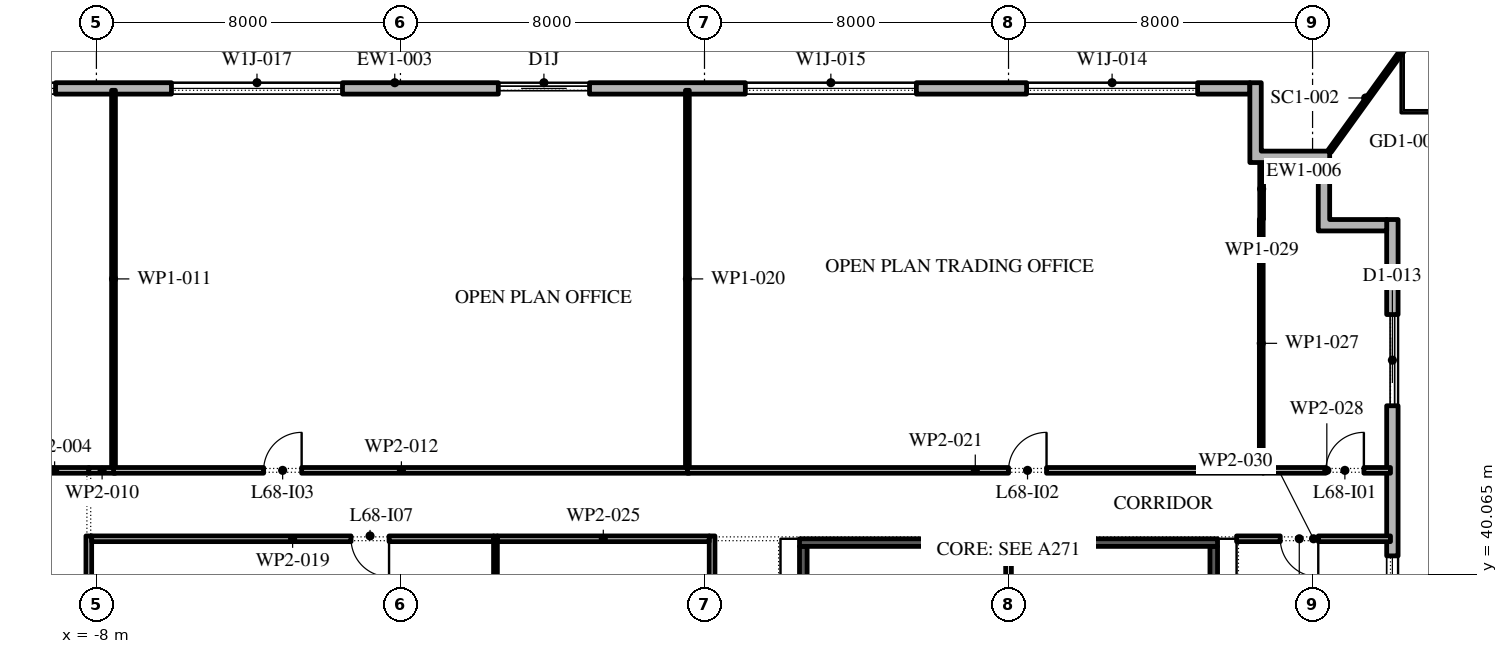
"""IFC4 building model, lengths in metres.
Left out: names, types, materials, properties, quantities, classifications, styles, units other than length and angle.
Written with IfcOpenShell. Run it as: python <this file> out.ifc"""

import sys

from ifc_helpers import new_model, si_unit, direction, frame, frame_2d, origin, place, context, subcontext, project, spatial, polyline, rectangle, outline, extrude, element, fill, save


model = new_model("IFC4")
c1 = context("Model", 3, precision=1e-05, world=origin(), true_north=direction((0.0, 1.0)))
c2 = subcontext(c1, "Body", "Model", "MODEL_VIEW")
j1 = project(units=[si_unit("LENGTHUNIT", "METRE"), si_unit("PLANEANGLEUNIT", "RADIAN")], contexts=[c1])
p1 = place(None, origin())
s1 = spatial("IfcSite", under=j1, at=p1, CompositionType="ELEMENT")
p2 = place(p1, origin())
s2 = spatial("IfcBuilding", under=s1, at=p2, CompositionType="ELEMENT")
p3 = place(p2, frame((0.0, 0.0, 313.2)))
s3 = spatial("IfcBuildingStorey", under=s2, at=p3, CompositionType="ELEMENT", Elevation=313.2)
p4 = place(p3, frame((26.1, -2.1, 0.0), z_axis=(0.0, 0.0, 1.0), x_axis=(0.0, 1.0, 0.0)))
e1 = element("IfcWall", 1, at=p4, inside=s3, PredefinedType="STANDARD", context=c2, shape_type="SweptSolid", body=[
    extrude(rectangle(XDim=51.5, YDim=0.3, at=frame_2d((25.75, 0.0))), origin(), (0.0, 0.0, 1.0), 4.0),
])
p5 = place(p4, frame((1.3, 0.0, 0.45)))
e2 = element("IfcOpeningElement", 2, at=p5, cuts=e1, PredefinedType="OPENING", context=c2, shape_type="SweptSolid", body=[
    extrude(rectangle(XDim=4.5, YDim=3.05, at=frame_2d((2.25, 1.525))), frame((0.0, 0.16, 0.0), z_axis=(0.0, -1.0, 0.0), x_axis=(1.0, 0.0, 0.0)), (0.0, 0.0, 1.0), 0.32),
])
p6 = place(p4, frame((8.55, 0.0, 0.45)))
e3 = element("IfcOpeningElement", 3, at=p6, cuts=e1, PredefinedType="OPENING", context=c2, shape_type="SweptSolid", body=[
    extrude(rectangle(XDim=4.5, YDim=3.05, at=frame_2d((2.25, 1.525))), frame((0.0, 0.16, 0.0), z_axis=(0.0, -1.0, 0.0), x_axis=(1.0, 0.0, 0.0)), (0.0, 0.0, 1.0), 0.32),
])
p7 = place(p4, frame((17.0, 0.0, 0.0)))
e4 = element("IfcOpeningElement", 4, at=p7, cuts=e1, PredefinedType="OPENING", context=c2, shape_type="SweptSolid", body=[
    extrude(rectangle(XDim=2.4, YDim=3.5, at=frame_2d((1.2, 1.75))), frame((0.0, 0.16, 0.0), z_axis=(0.0, -1.0, 0.0), x_axis=(1.0, 0.0, 0.0)), (0.0, 0.0, 1.0), 0.32),
])
p8 = place(p4, frame((23.35, 0.0, 0.45)))
e5 = element("IfcOpeningElement", 5, at=p8, cuts=e1, PredefinedType="OPENING", context=c2, shape_type="SweptSolid", body=[
    extrude(rectangle(XDim=4.5, YDim=3.05, at=frame_2d((2.25, 1.525))), frame((0.0, 0.16, 0.0), z_axis=(0.0, -1.0, 0.0), x_axis=(1.0, 0.0, 0.0)), (0.0, 0.0, 1.0), 0.32),
])
p9 = place(p4, frame((30.75, 0.0, 0.45)))
e6 = element("IfcOpeningElement", 6, at=p9, cuts=e1, PredefinedType="OPENING", context=c2, shape_type="SweptSolid", body=[
    extrude(rectangle(XDim=4.5, YDim=3.05, at=frame_2d((2.25, 1.525))), frame((0.0, 0.16, 0.0), z_axis=(0.0, -1.0, 0.0), x_axis=(1.0, 0.0, 0.0)), (0.0, 0.0, 1.0), 0.32),
])
p10 = place(p4, frame((38.15, 0.0, 0.45)))
e7 = element("IfcOpeningElement", 7, at=p10, cuts=e1, PredefinedType="OPENING", context=c2, shape_type="SweptSolid", body=[
    extrude(rectangle(XDim=4.5, YDim=3.05, at=frame_2d((2.25, 1.525))), frame((0.0, 0.16, 0.0), z_axis=(0.0, -1.0, 0.0), x_axis=(1.0, 0.0, 0.0)), (0.0, 0.0, 1.0), 0.32),
])
p11 = place(p4, frame((46.6, 0.0, 0.0)))
e8 = element("IfcOpeningElement", 8, at=p11, cuts=e1, PredefinedType="OPENING", context=c2, shape_type="SweptSolid", body=[
    extrude(rectangle(XDim=2.4, YDim=3.5, at=frame_2d((1.2, 1.75))), frame((0.0, 0.16, 0.0), z_axis=(0.0, -1.0, 0.0), x_axis=(1.0, 0.0, 0.0)), (0.0, 0.0, 1.0), 0.32),
])
p12 = place(p3, frame((22.35, 52.85, 0.0), z_axis=(0.0, 0.0, 1.0), x_axis=(-1.0, 0.0, 0.0)))
e9 = element("IfcWall", 9, at=p12, inside=s3, PredefinedType="STANDARD", context=c2, shape_type="SweptSolid", body=[
    extrude(rectangle(XDim=45.0, YDim=0.3, at=frame_2d((22.5, 0.0))), origin(), (0.0, 0.0, 1.0), 4.0),
])
p13 = place(p12, frame((1.375, 0.0, 0.45)))
e10 = element("IfcOpeningElement", 10, at=p13, cuts=e9, PredefinedType="OPENING", context=c2, shape_type="SweptSolid", body=[
    extrude(rectangle(XDim=4.5, YDim=2.675, at=frame_2d((2.25, 1.337))), frame((0.0, 0.16, 0.0), z_axis=(0.0, -1.0, 0.0), x_axis=(1.0, 0.0, 0.0)), (0.0, 0.0, 1.0), 0.32),
])
p14 = place(p12, frame((8.775, 0.0, 0.45)))
e11 = element("IfcOpeningElement", 11, at=p14, cuts=e9, PredefinedType="OPENING", context=c2, shape_type="SweptSolid", body=[
    extrude(rectangle(XDim=4.5, YDim=2.675, at=frame_2d((2.25, 1.337))), frame((0.0, 0.16, 0.0), z_axis=(0.0, -1.0, 0.0), x_axis=(1.0, 0.0, 0.0)), (0.0, 0.0, 1.0), 0.32),
])
p15 = place(p12, frame((17.375, 0.0, 0.0)))
e12 = element("IfcOpeningElement", 12, at=p15, cuts=e9, PredefinedType="OPENING", context=c2, shape_type="SweptSolid", body=[
    extrude(rectangle(XDim=2.4, YDim=3.125, at=frame_2d((1.2, 1.562))), frame((0.0, 0.16, 0.0), z_axis=(0.0, -1.0, 0.0), x_axis=(1.0, 0.0, 0.0)), (0.0, 0.0, 1.0), 0.32),
])
p16 = place(p12, frame((23.875, 0.0, 0.45)))
e13 = element("IfcOpeningElement", 13, at=p16, cuts=e9, PredefinedType="OPENING", context=c2, shape_type="SweptSolid", body=[
    extrude(rectangle(XDim=4.5, YDim=2.675, at=frame_2d((2.25, 1.337))), frame((0.0, 0.16, 0.0), z_axis=(0.0, -1.0, 0.0), x_axis=(1.0, 0.0, 0.0)), (0.0, 0.0, 1.0), 0.32),
])
p17 = place(p12, frame((31.425, 0.0, 0.45)))
e14 = element("IfcOpeningElement", 14, at=p17, cuts=e9, PredefinedType="OPENING", context=c2, shape_type="SweptSolid", body=[
    extrude(rectangle(XDim=4.5, YDim=2.675, at=frame_2d((2.25, 1.337))), frame((0.0, 0.16, 0.0), z_axis=(0.0, -1.0, 0.0), x_axis=(1.0, 0.0, 0.0)), (0.0, 0.0, 1.0), 0.32),
])
p18 = place(p12, frame((38.975, 0.0, 0.45)))
e15 = element("IfcOpeningElement", 15, at=p18, cuts=e9, PredefinedType="OPENING", context=c2, shape_type="SweptSolid", body=[
    extrude(rectangle(XDim=4.5, YDim=2.675, at=frame_2d((2.25, 1.337))), frame((0.0, 0.16, 0.0), z_axis=(0.0, -1.0, 0.0), x_axis=(1.0, 0.0, 0.0)), (0.0, 0.0, 1.0), 0.32),
])
p19 = place(p3, origin())
e16 = element("IfcWall", 16, at=p19, inside=s3, PredefinedType="STANDARD", context=c2, shape_type="SweptSolid", body=[
    extrude(outline(polyline([(24.15, 50.9), (22.35, 50.9), (22.35, 53.0), (22.65, 53.0), (22.65, 51.2), (24.45, 51.2), (24.45, 49.4), (25.95, 49.4), (25.95, 49.1), (24.15, 49.1), (24.15, 50.9)])), origin(), (0.0, 0.0, 1.0), 4.0),
])
p20 = place(p3, frame((24.45, 51.2, -0.05), z_axis=(0.0, 0.0, 1.0), x_axis=(0.585001892545, 0.811031926448, 0.0)))
e17 = element("IfcWall", 17, at=p20, inside=s3, PredefinedType="STANDARD", context=c2, shape_type="SweptSolid", body=[
    extrude(rectangle(XDim=3.375, YDim=0.1, at=frame_2d((1.688, 0.0))), origin(), (0.0, 0.0, 1.0), 4.05),
])
p21 = place(p3, frame((21.4, 25.75, 0.0), z_axis=(0.0, 0.0, 1.0), x_axis=(0.0, 1.0, 0.0)))
e18 = element("IfcWall", 18, at=p21, inside=s3, PredefinedType="SHEAR", context=c2, shape_type="SweptSolid", body=[
    extrude(rectangle(XDim=15.05, YDim=0.2, at=frame_2d((7.525, 0.0))), origin(), (0.0, 0.0, 1.0), 4.0),
])
p22 = place(p21, frame((7.075, 0.0, 0.0)))
e19 = element("IfcOpeningElement", 19, at=p22, cuts=e18, PredefinedType="OPENING", context=c2, shape_type="SweptSolid", body=[
    extrude(rectangle(XDim=0.9, YDim=2.1, at=frame_2d((0.45, 1.05))), frame((0.0, 0.11, 0.0), z_axis=(0.0, -1.0, 0.0), x_axis=(1.0, 0.0, 0.0)), (0.0, 0.0, 1.0), 0.22),
])
p23 = place(p3, frame((10.6, 25.75, 0.0), z_axis=(0.0, 0.0, 1.0), x_axis=(0.0, 1.0, 0.0)))
e20 = element("IfcWall", 20, at=p23, inside=s3, PredefinedType="SHEAR", context=c2, shape_type="SweptSolid", body=[
    extrude(rectangle(XDim=15.05, YDim=0.2, at=frame_2d((7.525, 0.0))), origin(), (0.0, 0.0, 1.0), 4.0),
])
p24 = place(p23, frame((7.075, 0.0, 0.0)))
e21 = element("IfcOpeningElement", 21, at=p24, cuts=e20, PredefinedType="OPENING", context=c2, shape_type="SweptSolid", body=[
    extrude(rectangle(XDim=0.9, YDim=2.1, at=frame_2d((0.45, 1.05))), frame((0.0, 0.11, 0.0), z_axis=(0.0, -1.0, 0.0), x_axis=(1.0, 0.0, 0.0)), (0.0, 0.0, 1.0), 0.22),
])
p25 = place(p3, frame((10.5, 40.9, 0.0), z_axis=(0.0, 0.0, 1.0), x_axis=(1.0, 0.0, 0.0)))
e22 = element("IfcWall", 22, at=p25, inside=s3, PredefinedType="SHEAR", context=c2, shape_type="SweptSolid", body=[
    extrude(rectangle(XDim=11.0, YDim=0.2, at=frame_2d((5.5, 0.0))), origin(), (0.0, 0.0, 1.0), 4.0),
])
p26 = place(p3, frame((16.0, 25.75, 0.0), z_axis=(0.0, 0.0, 1.0), x_axis=(0.0, 1.0, 0.0)))
e23 = element("IfcWall", 23, at=p26, inside=s3, PredefinedType="PARTITIONING", context=c2, shape_type="SweptSolid", body=[
    extrude(rectangle(XDim=15.05, YDim=0.15, at=frame_2d((7.525, 0.0))), origin(), (0.0, 0.0, 1.0), 4.0),
])
p27 = place(p3, frame((-10.0, 42.8, 0.0), z_axis=(0.0, 0.0, 1.0), x_axis=(1.0, 0.0, 0.0)))
e24 = element("IfcWall", 24, at=p27, inside=s3, PredefinedType="PARTITIONING", context=c2, shape_type="SweptSolid", body=[
    extrude(rectangle(XDim=1.8, YDim=0.15, at=frame_2d((0.9, 0.0))), origin(), (0.0, 0.0, 1.0), 4.0),
])
p28 = place(p3, frame((-8.2, 41.075, 0.0), z_axis=(0.0, 0.0, 1.0), x_axis=(0.0, -1.0, 0.0)))
e25 = element("IfcWall", 25, at=p28, inside=s3, PredefinedType="PARTITIONING", context=c2, shape_type="SweptSolid", body=[
    extrude(rectangle(XDim=9.575, YDim=0.15, at=frame_2d((4.788, 0.0))), origin(), (0.0, 0.0, 1.0), 4.0),
])
p29 = place(p3, frame((-8.2, 42.8, 0.0), z_axis=(0.0, 0.0, 1.0), x_axis=(1.0, 0.0, 0.0)))
e26 = element("IfcWall", 26, at=p29, inside=s3, PredefinedType="PARTITIONING", context=c2, shape_type="SweptSolid", body=[
    extrude(rectangle(XDim=0.7, YDim=0.15, at=frame_2d((0.35, 0.0))), origin(), (0.0, 0.0, 1.0), 4.0),
])
p30 = place(p3, frame((-7.55, 42.875, 0.0), z_axis=(0.0, 0.0, 1.0), x_axis=(0.0, 1.0, 0.0)))
e27 = element("IfcWall", 27, at=p30, inside=s3, PredefinedType="PARTITIONING", context=c2, shape_type="SweptSolid", body=[
    extrude(rectangle(XDim=9.925, YDim=0.1, at=frame_2d((4.962, 0.0))), origin(), (0.0, 0.0, 1.0), 4.0),
])
p31 = place(p3, frame((-7.55, 42.8, 0.0), z_axis=(0.0, 0.0, 1.0), x_axis=(1.0, 0.0, 0.0)))
e28 = element("IfcWall", 28, at=p31, inside=s3, PredefinedType="PARTITIONING", context=c2, shape_type="SweptSolid", body=[
    extrude(rectangle(XDim=15.15, YDim=0.15, at=frame_2d((7.575, 0.0))), origin(), (0.0, 0.0, 1.0), 4.0),
])
p32 = place(p31, frame((3.95, 0.0, 0.0)))
e29 = element("IfcOpeningElement", 29, at=p32, cuts=e28, PredefinedType="OPENING", context=c2, shape_type="SweptSolid", body=[
    extrude(rectangle(XDim=1.0, YDim=2.1, at=frame_2d((0.5, 1.05))), frame((0.0, 0.085, 0.0), z_axis=(0.0, -1.0, 0.0), x_axis=(1.0, 0.0, 0.0)), (0.0, 0.0, 1.0), 0.17),
])
p33 = place(p3, frame((2.5, 31.55, 0.0), z_axis=(0.0, 0.0, 1.0), x_axis=(0.0, 1.0, 0.0)))
e30 = element("IfcWall", 30, at=p33, inside=s3, PredefinedType="PARTITIONING", context=c2, shape_type="SweptSolid", body=[
    extrude(rectangle(XDim=9.525, YDim=0.1, at=frame_2d((4.762, 0.0))), origin(), (0.0, 0.0, 1.0), 4.0),
])
p34 = place(p3, frame((2.45, 41.0, 0.0), z_axis=(0.0, 0.0, 1.0), x_axis=(-1.0, 0.0, 0.0)))
e31 = element("IfcWall", 31, at=p34, inside=s3, PredefinedType="PARTITIONING", context=c2, shape_type="SweptSolid", body=[
    extrude(rectangle(XDim=10.575, YDim=0.15, at=frame_2d((5.288, 0.0))), origin(), (0.0, 0.0, 1.0), 4.0),
])
p35 = place(p34, frame((2.75, 0.0, 0.0)))
e32 = element("IfcOpeningElement", 32, at=p35, cuts=e31, PredefinedType="OPENING", context=c2, shape_type="SweptSolid", body=[
    extrude(rectangle(XDim=1.0, YDim=2.1, at=frame_2d((0.5, 1.05))), frame((0.0, 0.085, 0.0), z_axis=(0.0, -1.0, 0.0), x_axis=(1.0, 0.0, 0.0)), (0.0, 0.0, 1.0), 0.17),
])
p36 = place(p3, frame((7.55, 42.875, 0.0), z_axis=(0.0, 0.0, 1.0), x_axis=(0.0, 1.0, 0.0)))
e33 = element("IfcWall", 33, at=p36, inside=s3, PredefinedType="PARTITIONING", context=c2, shape_type="SweptSolid", body=[
    extrude(rectangle(XDim=9.925, YDim=0.1, at=frame_2d((4.962, 0.0))), origin(), (0.0, 0.0, 1.0), 4.0),
])
p37 = place(p3, frame((7.55, 42.8, 0.0), z_axis=(0.0, 0.0, 1.0), x_axis=(1.0, 0.0, 0.0)))
e34 = element("IfcWall", 34, at=p37, inside=s3, PredefinedType="PARTITIONING", context=c2, shape_type="SweptSolid", body=[
    extrude(rectangle(XDim=15.15, YDim=0.15, at=frame_2d((7.575, 0.0))), origin(), (0.0, 0.0, 1.0), 4.0),
])
p38 = place(p37, frame((8.45, 0.0, 0.0)))
e35 = element("IfcOpeningElement", 35, at=p38, cuts=e34, PredefinedType="OPENING", context=c2, shape_type="SweptSolid", body=[
    extrude(rectangle(XDim=1.0, YDim=2.1, at=frame_2d((0.5, 1.05))), frame((0.0, 0.085, 0.0), z_axis=(0.0, -1.0, 0.0), x_axis=(1.0, 0.0, 0.0)), (0.0, 0.0, 1.0), 0.17),
])
p39 = place(p3, frame((8.2, 25.5, 0.0), z_axis=(0.0, 0.0, 1.0), x_axis=(0.0, 1.0, 0.0)))
e36 = element("IfcWall", 36, at=p39, inside=s3, PredefinedType="PARTITIONING", context=c2, shape_type="SweptSolid", body=[
    extrude(rectangle(XDim=15.575, YDim=0.15, at=frame_2d((7.788, 0.0))), origin(), (0.0, 0.0, 1.0), 4.0),
])
p40 = place(p39, frame((4.1, 0.0, 0.0)))
e37 = element("IfcOpeningElement", 37, at=p40, cuts=e36, PredefinedType="OPENING", context=c2, shape_type="SweptSolid", body=[
    extrude(rectangle(XDim=1.0, YDim=2.1, at=frame_2d((0.5, 1.05))), frame((0.0, 0.085, 0.0), z_axis=(0.0, -1.0, 0.0), x_axis=(1.0, 0.0, 0.0)), (0.0, 0.0, 1.0), 0.17),
])
p41 = place(p3, frame((8.125, 41.0, 0.0), z_axis=(0.0, 0.0, 1.0), x_axis=(-1.0, 0.0, 0.0)))
e38 = element("IfcWall", 38, at=p41, inside=s3, PredefinedType="PARTITIONING", context=c2, shape_type="SweptSolid", body=[
    extrude(rectangle(XDim=5.575, YDim=0.15, at=frame_2d((2.788, 0.0))), origin(), (0.0, 0.0, 1.0), 4.0),
])
p42 = place(p3, frame((22.65, 42.875, 0.0), z_axis=(0.0, 0.0, 1.0), x_axis=(0.0, 1.0, 0.0)))
e39 = element("IfcWall", 39, at=p42, inside=s3, PredefinedType="PARTITIONING", context=c2, shape_type="SweptSolid", body=[
    extrude(rectangle(XDim=6.535, YDim=0.1, at=frame_2d((3.268, 0.0))), origin(), (0.0, 0.0, 1.0), 4.0),
])
p43 = place(p3, frame((22.7, 42.8, 0.0), z_axis=(0.0, 0.0, 1.0), x_axis=(1.0, 0.0, 0.0)))
e40 = element("IfcWall", 40, at=p43, inside=s3, PredefinedType="PARTITIONING", context=c2, shape_type="SweptSolid", body=[
    extrude(rectangle(XDim=3.35, YDim=0.15, at=frame_2d((1.675, 0.0))), origin(), (0.0, 0.0, 1.0), 4.0),
])
p44 = place(p43, frame((1.65, 0.0, 0.0)))
e41 = element("IfcOpeningElement", 41, at=p44, cuts=e40, PredefinedType="OPENING", context=c2, shape_type="SweptSolid", body=[
    extrude(rectangle(XDim=1.0, YDim=2.1, at=frame_2d((0.5, 1.05))), frame((0.0, 0.085, 0.0), z_axis=(0.0, -1.0, 0.0), x_axis=(1.0, 0.0, 0.0)), (0.0, 0.0, 1.0), 0.17),
])
p45 = place(p3, frame((22.66, 49.41, 0.0), z_axis=(0.0, 0.0, 1.0), x_axis=(0.0, 1.0, 0.0)))
e42 = element("IfcWall", 42, at=p45, inside=s3, PredefinedType="PARTITIONING", context=c2, shape_type="SweptSolid", body=[
    extrude(rectangle(XDim=1.59, YDim=0.1, at=frame_2d((0.795, 0.0))), origin(), (0.0, 0.0, 1.0), 4.0),
])
p46 = place(p3, frame((26.05, 41.0, 0.0), z_axis=(0.0, 0.0, 1.0), x_axis=(-1.0, 0.0, 0.0)))
e43 = element("IfcWall", 43, at=p46, inside=s3, PredefinedType="PARTITIONING", context=c2, shape_type="SweptSolid", body=[
    extrude(rectangle(XDim=4.05, YDim=0.15, at=frame_2d((2.025, 0.0))), origin(), (0.0, 0.0, 1.0), 4.0),
])
p47 = place(p46, frame((1.9, 0.0, 0.0)))
e44 = element("IfcOpeningElement", 44, at=p47, cuts=e43, PredefinedType="OPENING", context=c2, shape_type="SweptSolid", body=[
    extrude(rectangle(XDim=1.0, YDim=2.1, at=frame_2d((0.5, 1.05))), frame((0.0, 0.085, 0.0), z_axis=(0.0, -1.0, 0.0), x_axis=(1.0, 0.0, 0.0)), (0.0, 0.0, 1.0), 0.17),
])
p48 = place(p10, origin())
e45 = element("IfcWindow", 45, at=p48, inside=s3, PartitioningType="DOUBLE_PANEL_VERTICAL", PredefinedType="WINDOW", context=c2, shape_type="SweptSolid", body=[
    extrude(rectangle(XDim=4.5, YDim=3.05, at=frame_2d((2.25, 1.525))), frame((0.0, 0.03, 0.0), z_axis=(0.0, -1.0, 0.0), x_axis=(1.0, 0.0, 0.0)), (0.0, 0.0, 1.0), 0.06),
])
fill(e7, e45)
p49 = place(p11, origin())
e46 = element("IfcDoor", 46, at=p49, inside=s3, OperationType="DOUBLE_DOOR_SLIDING", PredefinedType="DOOR", context=c2, shape_type="SweptSolid", body=[
    extrude(rectangle(XDim=2.4, YDim=3.5, at=frame_2d((1.2, 1.75))), frame((0.0, 0.025, 0.0), z_axis=(0.0, -1.0, 0.0), x_axis=(1.0, 0.0, 0.0)), (0.0, 0.0, 1.0), 0.05),
])
fill(e8, e46)
p50 = place(p13, origin())
e47 = element("IfcWindow", 47, at=p50, inside=s3, PartitioningType="DOUBLE_PANEL_VERTICAL", PredefinedType="WINDOW", context=c2, shape_type="SweptSolid", body=[
    extrude(rectangle(XDim=4.5, YDim=2.675, at=frame_2d((2.25, 1.337))), frame((0.0, 0.03, 0.0), z_axis=(0.0, -1.0, 0.0), x_axis=(1.0, 0.0, 0.0)), (0.0, 0.0, 1.0), 0.06),
])
fill(e10, e47)
p51 = place(p14, origin())
e48 = element("IfcWindow", 48, at=p51, inside=s3, PartitioningType="DOUBLE_PANEL_VERTICAL", PredefinedType="WINDOW", context=c2, shape_type="SweptSolid", body=[
    extrude(rectangle(XDim=4.5, YDim=2.675, at=frame_2d((2.25, 1.337))), frame((0.0, 0.03, 0.0), z_axis=(0.0, -1.0, 0.0), x_axis=(1.0, 0.0, 0.0)), (0.0, 0.0, 1.0), 0.06),
])
fill(e11, e48)
p52 = place(p15, origin())
e49 = element("IfcDoor", 49, at=p52, inside=s3, OperationType="DOUBLE_DOOR_SLIDING", PredefinedType="DOOR", context=c2, shape_type="SweptSolid", body=[
    extrude(rectangle(XDim=2.4, YDim=3.125, at=frame_2d((1.2, 1.562))), frame((0.0, 0.025, 0.0), z_axis=(0.0, -1.0, 0.0), x_axis=(1.0, 0.0, 0.0)), (0.0, 0.0, 1.0), 0.05),
])
fill(e12, e49)
p53 = place(p16, origin())
e50 = element("IfcWindow", 50, at=p53, inside=s3, PartitioningType="DOUBLE_PANEL_VERTICAL", PredefinedType="WINDOW", context=c2, shape_type="SweptSolid", body=[
    extrude(rectangle(XDim=4.5, YDim=2.675, at=frame_2d((2.25, 1.337))), frame((0.0, 0.03, 0.0), z_axis=(0.0, -1.0, 0.0), x_axis=(1.0, 0.0, 0.0)), (0.0, 0.0, 1.0), 0.06),
])
fill(e13, e50)
p54 = place(p17, origin())
e51 = element("IfcWindow", 51, at=p54, inside=s3, PartitioningType="DOUBLE_PANEL_VERTICAL", PredefinedType="WINDOW", context=c2, shape_type="SweptSolid", body=[
    extrude(rectangle(XDim=4.5, YDim=2.675, at=frame_2d((2.25, 1.337))), frame((0.0, 0.03, 0.0), z_axis=(0.0, -1.0, 0.0), x_axis=(1.0, 0.0, 0.0)), (0.0, 0.0, 1.0), 0.06),
])
fill(e14, e51)
p55 = place(p44, origin())
e52 = element("IfcDoor", 52, at=p55, inside=s3, OperationType="SINGLE_SWING_LEFT", PredefinedType="DOOR", context=c2, shape_type="SweptSolid", body=[
    extrude(rectangle(XDim=1.0, YDim=2.1, at=frame_2d((0.5, 1.05))), frame((0.0, 0.025, 0.0), z_axis=(0.0, -1.0, 0.0), x_axis=(1.0, 0.0, 0.0)), (0.0, 0.0, 1.0), 0.05),
])
fill(e41, e52)
p56 = place(p38, origin())
e53 = element("IfcDoor", 53, at=p56, inside=s3, OperationType="SINGLE_SWING_LEFT", PredefinedType="DOOR", context=c2, shape_type="SweptSolid", body=[
    extrude(rectangle(XDim=1.0, YDim=2.1, at=frame_2d((0.5, 1.05))), frame((0.0, 0.025, 0.0), z_axis=(0.0, -1.0, 0.0), x_axis=(1.0, 0.0, 0.0)), (0.0, 0.0, 1.0), 0.05),
])
fill(e35, e53)
p57 = place(p32, origin())
e54 = element("IfcDoor", 54, at=p57, inside=s3, OperationType="SINGLE_SWING_LEFT", PredefinedType="DOOR", context=c2, shape_type="SweptSolid", body=[
    extrude(rectangle(XDim=1.0, YDim=2.1, at=frame_2d((0.5, 1.05))), frame((0.0, 0.025, 0.0), z_axis=(0.0, -1.0, 0.0), x_axis=(1.0, 0.0, 0.0)), (0.0, 0.0, 1.0), 0.05),
])
fill(e29, e54)
p58 = place(p35, origin())
e55 = element("IfcDoor", 55, at=p58, inside=s3, OperationType="SINGLE_SWING_RIGHT", PredefinedType="DOOR", context=c2, shape_type="SweptSolid", body=[
    extrude(rectangle(XDim=1.0, YDim=2.1, at=frame_2d((0.5, 1.05))), frame((0.0, 0.025, 0.0), z_axis=(0.0, -1.0, 0.0), x_axis=(1.0, 0.0, 0.0)), (0.0, 0.0, 1.0), 0.05),
])
fill(e32, e55)
p59 = place(p47, origin())
e56 = element("IfcDoor", 56, at=p59, inside=s3, OperationType="SINGLE_SWING_RIGHT", PredefinedType="DOOR", context=c2, shape_type="SweptSolid", body=[
    extrude(rectangle(XDim=1.0, YDim=2.1, at=frame_2d((0.5, 1.05))), frame((0.0, 0.025, 0.0), z_axis=(0.0, -1.0, 0.0), x_axis=(1.0, 0.0, 0.0)), (0.0, 0.0, 1.0), 0.05),
])
fill(e44, e56)
save(model, sys.argv[1])
